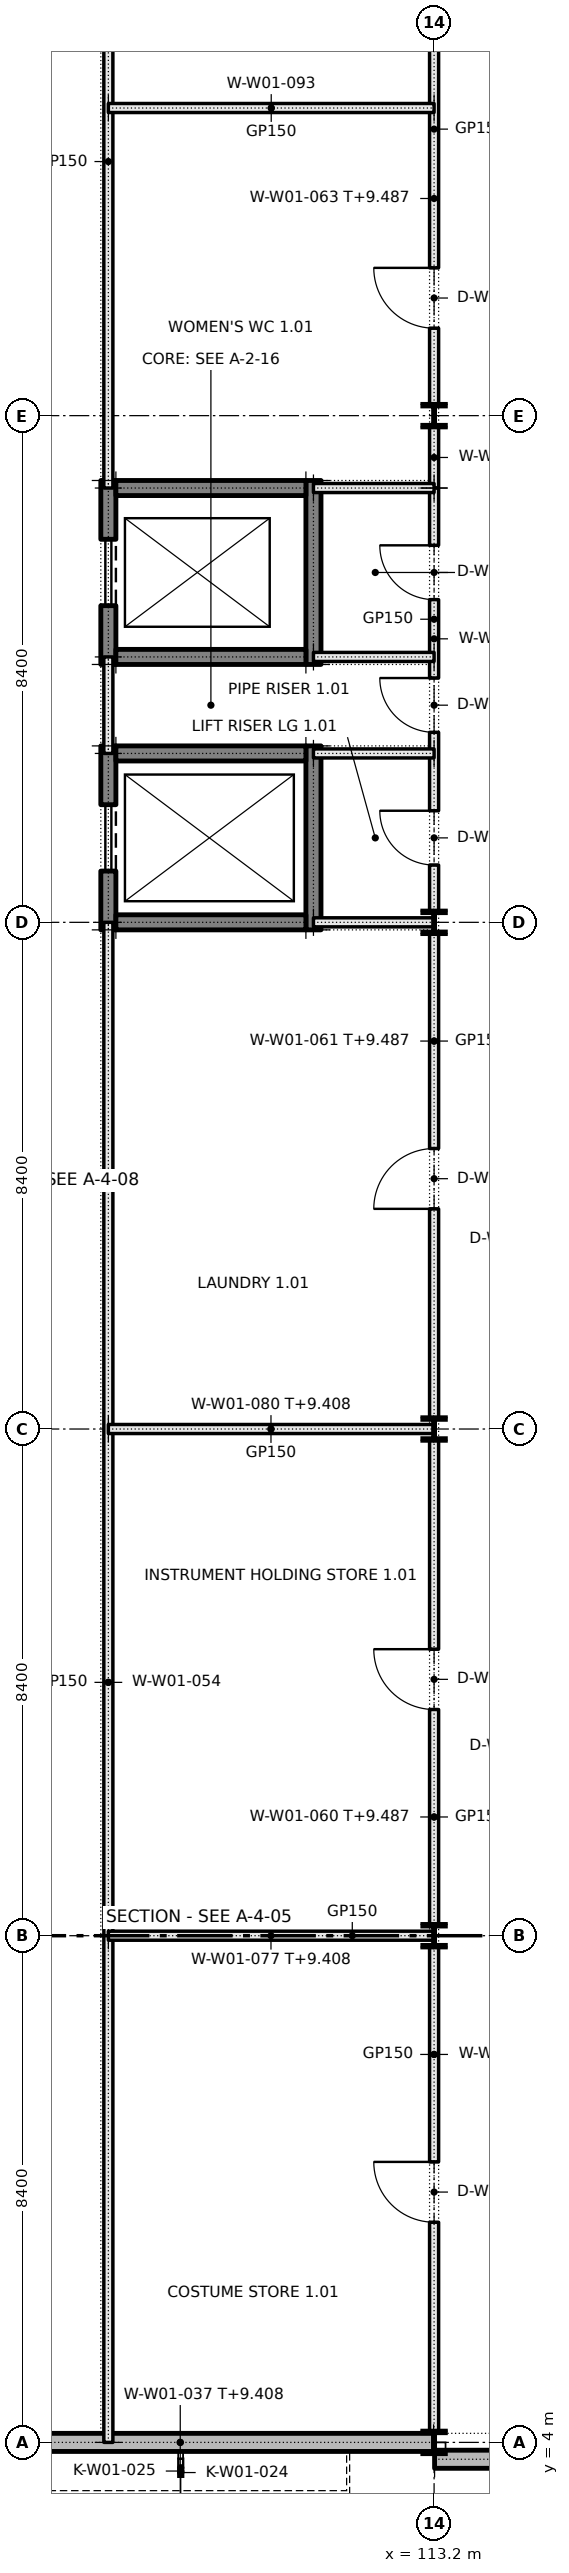
"""IFC4 building model, lengths in metres.
Left out: names, types, materials, properties, quantities, classifications, styles, units other than length and angle.
Written with IfcOpenShell. Run it as: python <this file> out.ifc"""

import sys

from ifc_helpers import new_model, si_unit, direction, frame, frame_2d, origin, origin_2d, place, context, subcontext, project, spatial, rectangle, i_section, extrude, element, fill, save


model = new_model("IFC4")
c1 = context("Model", 3, precision=1e-05, world=origin(), true_north=direction((0.0, 1.0)))
c2 = subcontext(c1, "Body", "Model", "MODEL_VIEW")
j1 = project(units=[si_unit("LENGTHUNIT", "METRE"), si_unit("PLANEANGLEUNIT", "RADIAN")], contexts=[c1])
p1 = place(None, origin())
s1 = spatial("IfcSite", under=j1, at=p1, CompositionType="ELEMENT")
p2 = place(p1, origin())
s2 = spatial("IfcBuilding", under=s1, at=p2, CompositionType="ELEMENT")
p3 = place(p2, frame((0.0, 0.0, 5.4)))
s3 = spatial("IfcBuildingStorey", under=s2, at=p3, CompositionType="ELEMENT", Elevation=5.4)
p4 = place(p3, frame((107.8, 29.075, 0.0), z_axis=(0.0, 0.0, 1.0), x_axis=(0.0, 1.0, 0.0)))
e1 = element("IfcWall", 1, at=p4, inside=s3, PredefinedType="SOLIDWALL", context=c2, shape_type="SweptSolid", body=[
    extrude(rectangle(XDim=3.05, YDim=0.25, at=frame_2d((1.525, 0.0))), origin(), (0.0, 0.0, 1.0), 4.8),
])
p5 = place(p4, frame((0.975, 0.0, 0.0)))
e2 = element("IfcOpeningElement", 2, at=p5, cuts=e1, PredefinedType="OPENING", context=c2, shape_type="SweptSolid", body=[
    extrude(rectangle(XDim=1.1, YDim=2.1, at=frame_2d((0.55, 1.05))), frame((0.0, 0.135, 0.0), z_axis=(0.0, -1.0, 0.0), x_axis=(1.0, 0.0, 0.0)), (0.0, 0.0, 1.0), 0.27),
])
p6 = place(p3, frame((111.2, 29.075, 0.0), z_axis=(0.0, 0.0, 1.0), x_axis=(0.0, 1.0, 0.0)))
e3 = element("IfcWall", 3, at=p6, inside=s3, PredefinedType="SOLIDWALL", context=c2, shape_type="SweptSolid", body=[
    extrude(rectangle(XDim=3.05, YDim=0.25, at=frame_2d((1.525, 0.0))), origin(), (0.0, 0.0, 1.0), 4.8),
])
for number, where, z_axis, x_axis in (
    (4, (107.925, 29.2, 0.0), (0.0, 0.0, 1.0), (1.0, 0.0, 0.0)),
    (5, (107.925, 32.0, 0.0), (0.0, 0.0, 1.0), (1.0, 0.0, 0.0)),
):
    element("IfcWall", number, at=place(p3, frame(where, z_axis=z_axis, x_axis=x_axis)), inside=s3, PredefinedType="SOLIDWALL", context=c2, shape_type="SweptSolid", body=[
        extrude(rectangle(XDim=3.15, YDim=0.25, at=frame_2d((1.575, 0.0))), origin(), (0.0, 0.0, 1.0), 4.8),
    ])
p7 = place(p3, frame((107.8, 33.475, 0.0), z_axis=(0.0, 0.0, 1.0), x_axis=(0.0, 1.0, 0.0)))
e6 = element("IfcWall", 6, at=p7, inside=s3, PredefinedType="SOLIDWALL", context=c2, shape_type="SweptSolid", body=[
    extrude(rectangle(XDim=3.05, YDim=0.25, at=frame_2d((1.525, 0.0))), origin(), (0.0, 0.0, 1.0), 4.8),
])
p8 = place(p7, frame((0.975, 0.0, 0.0)))
e7 = element("IfcOpeningElement", 7, at=p8, cuts=e6, PredefinedType="OPENING", context=c2, shape_type="SweptSolid", body=[
    extrude(rectangle(XDim=1.1, YDim=2.1, at=frame_2d((0.55, 1.05))), frame((0.0, 0.135, 0.0), z_axis=(0.0, -1.0, 0.0), x_axis=(1.0, 0.0, 0.0)), (0.0, 0.0, 1.0), 0.27),
])
p9 = place(p3, frame((111.2, 33.475, 0.0), z_axis=(0.0, 0.0, 1.0), x_axis=(0.0, 1.0, 0.0)))
e8 = element("IfcWall", 8, at=p9, inside=s3, PredefinedType="SOLIDWALL", context=c2, shape_type="SweptSolid", body=[
    extrude(rectangle(XDim=3.05, YDim=0.25, at=frame_2d((1.525, 0.0))), origin(), (0.0, 0.0, 1.0), 4.8),
])
for number, where, z_axis, x_axis in (
    (9, (107.925, 33.6, 0.0), (0.0, 0.0, 1.0), (1.0, 0.0, 0.0)),
    (10, (107.925, 36.4, 0.0), (0.0, 0.0, 1.0), (1.0, 0.0, 0.0)),
):
    element("IfcWall", number, at=place(p3, frame(where, z_axis=z_axis, x_axis=x_axis)), inside=s3, PredefinedType="SOLIDWALL", context=c2, shape_type="SweptSolid", body=[
        extrude(rectangle(XDim=3.15, YDim=0.25, at=frame_2d((1.575, 0.0))), origin(), (0.0, 0.0, 1.0), 4.8),
    ])
for number, where, z_axis, x_axis in (
    (11, (113.2, 4.0, 0.0), (0.0, 0.0, 1.0), (1.0, 0.0, 0.0)),
    (12, (113.2, 12.4, 0.0), (0.0, 0.0, 1.0), (1.0, 0.0, 0.0)),
    (13, (113.2, 20.8, 0.0), (0.0, 0.0, 1.0), (1.0, 0.0, 0.0)),
    (14, (113.2, 29.2, 0.0), (0.0, 0.0, 1.0), (1.0, 0.0, 0.0)),
    (15, (113.2, 37.6, 0.0), (0.0, 0.0, 1.0), (1.0, 0.0, 0.0)),
):
    element("IfcColumn", number, at=place(p3, frame(where, z_axis=z_axis, x_axis=x_axis)), inside=s3, PredefinedType="COLUMN", context=c2, shape_type="SweptSolid", body=[
        extrude(i_section(OverallWidth=0.373, OverallDepth=0.373, WebThickness=0.016, FlangeThickness=0.026, FilletRadius=0.015, at=origin_2d()), origin(), (0.0, 0.0, 1.0), 4.8),
    ])
p10 = place(p3, frame((104.792, 4.0, 0.0), z_axis=(0.0, 0.0, 1.0), x_axis=(1.0, 0.0, 0.0)))
e16 = element("IfcWall", 16, at=p10, inside=s3, PredefinedType="SOLIDWALL", context=c2, shape_type="SweptSolid", body=[
    extrude(rectangle(XDim=8.4, YDim=0.3, at=frame_2d((4.2, 0.0))), origin(), (0.0, 0.0, 1.0), 4.008),
])
p11 = place(p3, frame((113.208, 3.72, 0.0), z_axis=(0.0, 0.0, 1.0), x_axis=(1.0, 0.0, 0.0)))
e17 = element("IfcWall", 17, at=p11, inside=s3, PredefinedType="SOLIDWALL", context=c2, shape_type="SweptSolid", body=[
    extrude(rectangle(XDim=5.117, YDim=0.3, at=frame_2d((2.558, 0.0))), origin(), (0.0, 0.0, 1.0), 4.8),
])
p12 = place(p3, frame((107.8, 4.0, 0.0), z_axis=(0.0, 0.0, 1.0), x_axis=(0.0, 1.0, 0.0)))
e18 = element("IfcWall", 18, at=p12, inside=s3, PredefinedType="PARTITIONING", context=c2, shape_type="SweptSolid", body=[
    extrude(rectangle(XDim=25.2, YDim=0.15, at=frame_2d((12.6, 0.0))), origin(), (0.0, 0.0, 1.0), 4.8),
])
p13 = place(p3, frame((107.8, 36.4, 0.0), z_axis=(0.0, 0.0, 1.0), x_axis=(0.0, 1.0, 0.0)))
e19 = element("IfcWall", 19, at=p13, inside=s3, PredefinedType="PARTITIONING", context=c2, shape_type="SweptSolid", body=[
    extrude(rectangle(XDim=42.0, YDim=0.15, at=frame_2d((21.0, 0.0))), origin(), (0.0, 0.0, 1.0), 4.8),
])
p14 = place(p3, frame((107.8, 32.0, 0.0), z_axis=(0.0, 0.0, 1.0), x_axis=(0.0, 1.0, 0.0)))
e20 = element("IfcWall", 20, at=p14, inside=s3, PredefinedType="PARTITIONING", context=c2, shape_type="SweptSolid", body=[
    extrude(rectangle(XDim=1.6, YDim=0.15, at=frame_2d((0.8, 0.0))), origin(), (0.0, 0.0, 1.0), 4.8),
])
p15 = place(p3, frame((113.2, 4.187, 0.0), z_axis=(0.0, 0.0, 1.0), x_axis=(0.0, 1.0, 0.0)))
e21 = element("IfcWall", 21, at=p15, inside=s3, PredefinedType="PARTITIONING", context=c2, shape_type="SweptSolid", body=[
    extrude(rectangle(XDim=8.027, YDim=0.15, at=frame_2d((4.013, 0.0))), origin(), (0.0, 0.0, 1.0), 4.087),
])
p16 = place(p15, frame((3.463, 0.0, 0.0)))
e22 = element("IfcOpeningElement", 22, at=p16, cuts=e21, PredefinedType="OPENING", context=c2, shape_type="SweptSolid", body=[
    extrude(rectangle(XDim=1.0, YDim=2.1, at=frame_2d((0.5, 1.05))), frame((0.0, 0.085, 0.0), z_axis=(0.0, -1.0, 0.0), x_axis=(1.0, 0.0, 0.0)), (0.0, 0.0, 1.0), 0.17),
])
p17 = place(p3, frame((113.2, 12.587, 0.0), z_axis=(0.0, 0.0, 1.0), x_axis=(0.0, 1.0, 0.0)))
e23 = element("IfcWall", 23, at=p17, inside=s3, PredefinedType="PARTITIONING", context=c2, shape_type="SweptSolid", body=[
    extrude(rectangle(XDim=8.027, YDim=0.15, at=frame_2d((4.013, 0.0))), origin(), (0.0, 0.0, 1.0), 4.087),
])
p18 = place(p17, frame((3.563, 0.0, 0.0)))
e24 = element("IfcOpeningElement", 24, at=p18, cuts=e23, PredefinedType="OPENING", context=c2, shape_type="SweptSolid", body=[
    extrude(rectangle(XDim=1.0, YDim=2.1, at=frame_2d((0.5, 1.05))), frame((0.0, 0.085, 0.0), z_axis=(0.0, -1.0, 0.0), x_axis=(1.0, 0.0, 0.0)), (0.0, 0.0, 1.0), 0.17),
])
p19 = place(p3, frame((113.2, 20.987, 0.0), z_axis=(0.0, 0.0, 1.0), x_axis=(0.0, 1.0, 0.0)))
e25 = element("IfcWall", 25, at=p19, inside=s3, PredefinedType="PARTITIONING", context=c2, shape_type="SweptSolid", body=[
    extrude(rectangle(XDim=8.027, YDim=0.15, at=frame_2d((4.013, 0.0))), origin(), (0.0, 0.0, 1.0), 4.087),
])
p20 = place(p19, frame((3.463, 0.0, 0.0)))
e26 = element("IfcOpeningElement", 26, at=p20, cuts=e25, PredefinedType="OPENING", context=c2, shape_type="SweptSolid", body=[
    extrude(rectangle(XDim=1.0, YDim=2.1, at=frame_2d((0.5, 1.05))), frame((0.0, 0.085, 0.0), z_axis=(0.0, -1.0, 0.0), x_axis=(1.0, 0.0, 0.0)), (0.0, 0.0, 1.0), 0.17),
])
p21 = place(p3, frame((113.2, 36.4, 0.0), z_axis=(0.0, 0.0, 1.0), x_axis=(0.0, 1.0, 0.0)))
e27 = element("IfcWall", 27, at=p21, inside=s3, PredefinedType="PARTITIONING", context=c2, shape_type="SweptSolid", body=[
    extrude(rectangle(XDim=1.013, YDim=0.15, at=frame_2d((0.507, 0.0))), origin(), (0.0, 0.0, 1.0), 4.087),
])
p22 = place(p3, frame((113.2, 37.787, 0.0), z_axis=(0.0, 0.0, 1.0), x_axis=(0.0, 1.0, 0.0)))
e28 = element("IfcWall", 28, at=p22, inside=s3, PredefinedType="PARTITIONING", context=c2, shape_type="SweptSolid", body=[
    extrude(rectangle(XDim=8.027, YDim=0.15, at=frame_2d((4.013, 0.0))), origin(), (0.0, 0.0, 1.0), 4.087),
])
p23 = place(p22, frame((1.263, 0.0, 0.0)))
e29 = element("IfcOpeningElement", 29, at=p23, cuts=e28, PredefinedType="OPENING", context=c2, shape_type="SweptSolid", body=[
    extrude(rectangle(XDim=1.0, YDim=2.1, at=frame_2d((0.5, 1.05))), frame((0.0, 0.085, 0.0), z_axis=(0.0, -1.0, 0.0), x_axis=(1.0, 0.0, 0.0)), (0.0, 0.0, 1.0), 0.17),
])
p24 = place(p22, frame((6.863, 0.0, 0.0)))
e30 = element("IfcOpeningElement", 30, at=p24, cuts=e28, PredefinedType="OPENING", context=c2, shape_type="SweptSolid", body=[
    extrude(rectangle(XDim=1.0, YDim=2.1, at=frame_2d((0.5, 1.05))), frame((0.0, 0.085, 0.0), z_axis=(0.0, -1.0, 0.0), x_axis=(1.0, 0.0, 0.0)), (0.0, 0.0, 1.0), 0.17),
])
p25 = place(p3, frame((113.2, 29.387, 0.0), z_axis=(0.0, 0.0, 1.0), x_axis=(0.0, 1.0, 0.0)))
e31 = element("IfcWall", 31, at=p25, inside=s3, PredefinedType="PARTITIONING", context=c2, shape_type="SweptSolid", body=[
    extrude(rectangle(XDim=7.013, YDim=0.15, at=frame_2d((3.507, 0.0))), origin(), (0.0, 0.0, 1.0), 4.087),
])
p26 = place(p25, frame((0.763, 0.0, 0.0)))
e32 = element("IfcOpeningElement", 32, at=p26, cuts=e31, PredefinedType="OPENING", context=c2, shape_type="SweptSolid", body=[
    extrude(rectangle(XDim=0.9, YDim=2.1, at=frame_2d((0.45, 1.05))), frame((0.0, 0.085, 0.0), z_axis=(0.0, -1.0, 0.0), x_axis=(1.0, 0.0, 0.0)), (0.0, 0.0, 1.0), 0.17),
])
p27 = place(p25, frame((2.963, 0.0, 0.0)))
e33 = element("IfcOpeningElement", 33, at=p27, cuts=e31, PredefinedType="OPENING", context=c2, shape_type="SweptSolid", body=[
    extrude(rectangle(XDim=0.9, YDim=2.1, at=frame_2d((0.45, 1.05))), frame((0.0, 0.085, 0.0), z_axis=(0.0, -1.0, 0.0), x_axis=(1.0, 0.0, 0.0)), (0.0, 0.0, 1.0), 0.17),
])
p28 = place(p25, frame((5.163, 0.0, 0.0)))
e34 = element("IfcOpeningElement", 34, at=p28, cuts=e31, PredefinedType="OPENING", context=c2, shape_type="SweptSolid", body=[
    extrude(rectangle(XDim=0.9, YDim=2.1, at=frame_2d((0.45, 1.05))), frame((0.0, 0.085, 0.0), z_axis=(0.0, -1.0, 0.0), x_axis=(1.0, 0.0, 0.0)), (0.0, 0.0, 1.0), 0.17),
])
for number, where, z_axis, x_axis in (
    (35, (107.8, 12.4, 0.0), (0.0, 0.0, 1.0), (1.0, 0.0, 0.0)),
    (36, (107.8, 20.8, 0.0), (0.0, 0.0, 1.0), (1.0, 0.0, 0.0)),
):
    element("IfcWall", number, at=place(p3, frame(where, z_axis=z_axis, x_axis=x_axis)), inside=s3, PredefinedType="PARTITIONING", context=c2, shape_type="SweptSolid", body=[
        extrude(rectangle(XDim=5.392, YDim=0.15, at=frame_2d((2.696, 0.0))), origin(), (0.0, 0.0, 1.0), 4.008),
    ])
p29 = place(p3, frame((111.2, 29.2, 0.0), z_axis=(0.0, 0.0, 1.0), x_axis=(1.0, 0.0, 0.0)))
e37 = element("IfcWall", 37, at=p29, inside=s3, PredefinedType="PARTITIONING", context=c2, shape_type="SweptSolid", body=[
    extrude(rectangle(XDim=1.992, YDim=0.15, at=frame_2d((0.996, 0.0))), origin(), (0.0, 0.0, 1.0), 4.008),
])
for number, where, z_axis, x_axis in (
    (38, (111.2, 32.0, 0.0), (0.0, 0.0, 1.0), (1.0, 0.0, 0.0)),
    (39, (111.2, 33.6, 0.0), (0.0, 0.0, 1.0), (1.0, 0.0, 0.0)),
    (40, (111.2, 36.4, 0.0), (0.0, 0.0, 1.0), (1.0, 0.0, 0.0)),
):
    element("IfcWall", number, at=place(p3, frame(where, z_axis=z_axis, x_axis=x_axis)), inside=s3, PredefinedType="PARTITIONING", context=c2, shape_type="SweptSolid", body=[
        extrude(rectangle(XDim=2.0, YDim=0.15, at=frame_2d((1.0, 0.0))), origin(), (0.0, 0.0, 1.0), 4.8),
    ])
p30 = place(p3, frame((107.8, 42.7, 0.0), z_axis=(0.0, 0.0, 1.0), x_axis=(1.0, 0.0, 0.0)))
e41 = element("IfcWall", 41, at=p30, inside=s3, PredefinedType="PARTITIONING", context=c2, shape_type="SweptSolid", body=[
    extrude(rectangle(XDim=5.4, YDim=0.15, at=frame_2d((2.7, 0.0))), origin(), (0.0, 0.0, 1.0), 4.8),
])
p31 = place(p5, origin())
e42 = element("IfcDoor", 42, at=p31, inside=s3, OperationType="SLIDING_TO_LEFT", PredefinedType="DOOR", context=c2, shape_type="SweptSolid", body=[
    extrude(rectangle(XDim=1.1, YDim=2.1, at=frame_2d((0.55, 1.05))), frame((0.0, 0.025, 0.0), z_axis=(0.0, -1.0, 0.0), x_axis=(1.0, 0.0, 0.0)), (0.0, 0.0, 1.0), 0.05),
])
fill(e2, e42)
p32 = place(p8, origin())
e43 = element("IfcDoor", 43, at=p32, inside=s3, OperationType="SLIDING_TO_LEFT", PredefinedType="DOOR", context=c2, shape_type="SweptSolid", body=[
    extrude(rectangle(XDim=1.1, YDim=2.1, at=frame_2d((0.55, 1.05))), frame((0.0, 0.025, 0.0), z_axis=(0.0, -1.0, 0.0), x_axis=(1.0, 0.0, 0.0)), (0.0, 0.0, 1.0), 0.05),
])
fill(e7, e43)
p33 = place(p26, origin())
e44 = element("IfcDoor", 44, at=p33, inside=s3, OperationType="SINGLE_SWING_RIGHT", PredefinedType="DOOR", context=c2, shape_type="SweptSolid", body=[
    extrude(rectangle(XDim=0.9, YDim=2.1, at=frame_2d((0.45, 1.05))), frame((0.0, 0.025, 0.0), z_axis=(0.0, -1.0, 0.0), x_axis=(1.0, 0.0, 0.0)), (0.0, 0.0, 1.0), 0.05),
])
fill(e32, e44)
p34 = place(p27, origin())
e45 = element("IfcDoor", 45, at=p34, inside=s3, OperationType="SINGLE_SWING_RIGHT", PredefinedType="DOOR", context=c2, shape_type="SweptSolid", body=[
    extrude(rectangle(XDim=0.9, YDim=2.1, at=frame_2d((0.45, 1.05))), frame((0.0, 0.025, 0.0), z_axis=(0.0, -1.0, 0.0), x_axis=(1.0, 0.0, 0.0)), (0.0, 0.0, 1.0), 0.05),
])
fill(e33, e45)
p35 = place(p28, origin())
e46 = element("IfcDoor", 46, at=p35, inside=s3, OperationType="SINGLE_SWING_RIGHT", PredefinedType="DOOR", context=c2, shape_type="SweptSolid", body=[
    extrude(rectangle(XDim=0.9, YDim=2.1, at=frame_2d((0.45, 1.05))), frame((0.0, 0.025, 0.0), z_axis=(0.0, -1.0, 0.0), x_axis=(1.0, 0.0, 0.0)), (0.0, 0.0, 1.0), 0.05),
])
fill(e34, e46)
p36 = place(p16, origin())
e47 = element("IfcDoor", 47, at=p36, inside=s3, OperationType="SINGLE_SWING_RIGHT", PredefinedType="DOOR", context=c2, shape_type="SweptSolid", body=[
    extrude(rectangle(XDim=1.0, YDim=2.1, at=frame_2d((0.5, 1.05))), frame((0.0, 0.025, 0.0), z_axis=(0.0, -1.0, 0.0), x_axis=(1.0, 0.0, 0.0)), (0.0, 0.0, 1.0), 0.05),
])
fill(e22, e47)
p37 = place(p18, origin())
e48 = element("IfcDoor", 48, at=p37, inside=s3, OperationType="SINGLE_SWING_RIGHT", PredefinedType="DOOR", context=c2, shape_type="SweptSolid", body=[
    extrude(rectangle(XDim=1.0, YDim=2.1, at=frame_2d((0.5, 1.05))), frame((0.0, 0.025, 0.0), z_axis=(0.0, -1.0, 0.0), x_axis=(1.0, 0.0, 0.0)), (0.0, 0.0, 1.0), 0.05),
])
fill(e24, e48)
p38 = place(p20, origin())
e49 = element("IfcDoor", 49, at=p38, inside=s3, OperationType="SINGLE_SWING_LEFT", PredefinedType="DOOR", context=c2, shape_type="SweptSolid", body=[
    extrude(rectangle(XDim=1.0, YDim=2.1, at=frame_2d((0.5, 1.05))), frame((0.0, 0.025, 0.0), z_axis=(0.0, -1.0, 0.0), x_axis=(1.0, 0.0, 0.0)), (0.0, 0.0, 1.0), 0.05),
])
fill(e26, e49)
p39 = place(p23, origin())
e50 = element("IfcDoor", 50, at=p39, inside=s3, OperationType="SINGLE_SWING_RIGHT", PredefinedType="DOOR", context=c2, shape_type="SweptSolid", body=[
    extrude(rectangle(XDim=1.0, YDim=2.1, at=frame_2d((0.5, 1.05))), frame((0.0, 0.025, 0.0), z_axis=(0.0, -1.0, 0.0), x_axis=(1.0, 0.0, 0.0)), (0.0, 0.0, 1.0), 0.05),
])
fill(e29, e50)
save(model, sys.argv[1])
